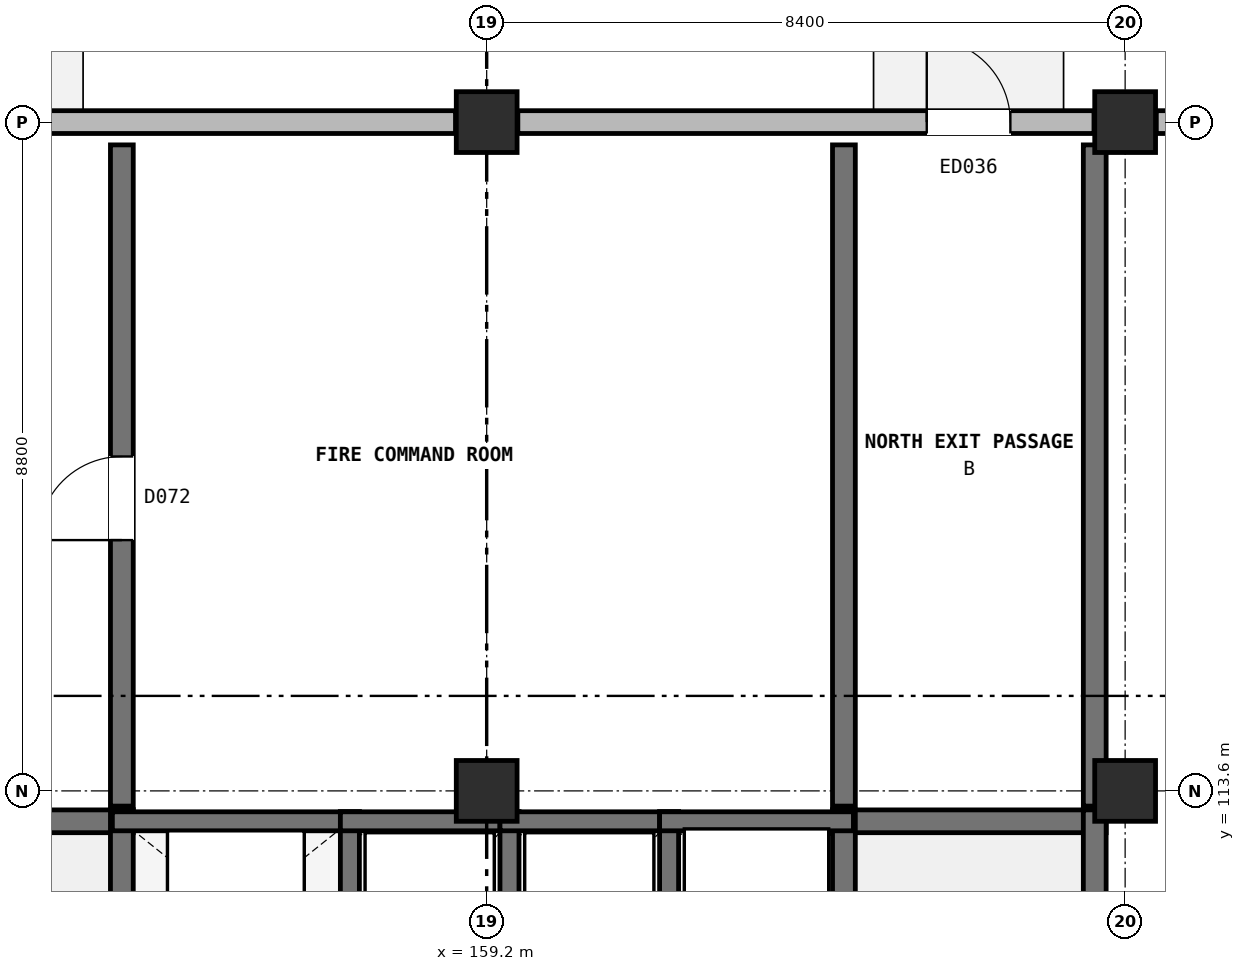
"""IFC4 building model, lengths in metres.
Left out: names, types, materials, properties, quantities, classifications, styles, units other than length and angle.
Written with IfcOpenShell. Run it as: python <this file> out.ifc"""

import sys

from ifc_helpers import new_model, si_unit, direction, frame, frame_2d, origin, origin_2d, place, context, subcontext, project, spatial, rectangle, extrude, element, fill, save


model = new_model("IFC4")
c1 = context("Model", 3, precision=1e-05, world=origin(), true_north=direction((0.0, 1.0)))
c2 = subcontext(c1, "Body", "Model", "MODEL_VIEW")
j1 = project(units=[si_unit("LENGTHUNIT", "METRE"), si_unit("PLANEANGLEUNIT", "RADIAN")], contexts=[c1])
p1 = place(None, origin())
s1 = spatial("IfcSite", under=j1, at=p1, CompositionType="ELEMENT")
p2 = place(p1, origin())
s2 = spatial("IfcBuilding", under=s1, at=p2, CompositionType="ELEMENT")
p3 = place(p2, origin())
s3 = spatial("IfcBuildingStorey", under=s2, at=p3, CompositionType="ELEMENT", Elevation=0.0)
for number, where, z_axis, x_axis in (
    (1, (159.2, 113.6, 0.0), (0.0, 0.0, 1.0), (1.0, 0.0, 0.0)),
    (2, (159.2, 122.4, 0.0), (0.0, 0.0, 1.0), (1.0, 0.0, 0.0)),
    (3, (167.6, 113.6, 0.0), (0.0, 0.0, 1.0), (1.0, 0.0, 0.0)),
    (4, (167.6, 122.4, 0.0), (0.0, 0.0, 1.0), (1.0, 0.0, 0.0)),
):
    element("IfcColumn", number, at=place(p3, frame(where, z_axis=z_axis, x_axis=x_axis)), inside=s3, PredefinedType="COLUMN", context=c2, shape_type="SweptSolid", body=[
        extrude(rectangle(XDim=0.8, YDim=0.8, at=origin_2d()), origin(), (0.0, 0.0, 1.0), 4.8),
    ])
p4 = place(p3, frame((175.59, 122.4, 0.0), z_axis=(0.0, 0.0, 1.0), x_axis=(-1.0, 0.0, 0.0)))
e5 = element("IfcWall", 5, at=p4, inside=s3, PredefinedType="SOLIDWALL", context=c2, shape_type="SweptSolid", body=[
    extrude(rectangle(XDim=7.58, YDim=0.3, at=frame_2d((3.79, 0.0))), origin(), (0.0, 0.0, 1.0), 4.05),
])
p5 = place(p4, frame((1.245, 0.0, 0.9)))
e6 = element("IfcOpeningElement", 6, at=p5, cuts=e5, PredefinedType="OPENING", context=c2, shape_type="SweptSolid", body=[
    extrude(rectangle(XDim=1.5, YDim=1.8, at=frame_2d((0.75, 0.9))), frame((0.0, 0.16, 0.0), z_axis=(0.0, -1.0, 0.0), x_axis=(1.0, 0.0, 0.0)), (0.0, 0.0, 1.0), 0.32),
])
p6 = place(p3, frame((167.19, 122.4, 0.0), z_axis=(0.0, 0.0, 1.0), x_axis=(-1.0, 0.0, 0.0)))
e7 = element("IfcWall", 7, at=p6, inside=s3, PredefinedType="SOLIDWALL", context=c2, shape_type="SweptSolid", body=[
    extrude(rectangle(XDim=7.58, YDim=0.3, at=frame_2d((3.79, 0.0))), origin(), (0.0, 0.0, 1.0), 4.05),
])
p7 = place(p6, frame((1.1, 0.0, 0.0)))
e8 = element("IfcOpeningElement", 8, at=p7, cuts=e7, PredefinedType="OPENING", context=c2, shape_type="SweptSolid", body=[
    extrude(rectangle(XDim=1.1, YDim=2.2, at=frame_2d((0.55, 1.1))), frame((0.0, 0.16, 0.0), z_axis=(0.0, -1.0, 0.0), x_axis=(1.0, 0.0, 0.0)), (0.0, 0.0, 1.0), 0.32),
])
p8 = place(p3, frame((158.79, 122.4, 0.0), z_axis=(0.0, 0.0, 1.0), x_axis=(-1.0, 0.0, 0.0)))
e9 = element("IfcWall", 9, at=p8, inside=s3, PredefinedType="SOLIDWALL", context=c2, shape_type="SweptSolid", body=[
    extrude(rectangle(XDim=7.58, YDim=0.3, at=frame_2d((3.79, 0.0))), origin(), (0.0, 0.0, 1.0), 4.05),
])
p9 = place(p8, frame((5.6, 0.0, 0.0)))
e10 = element("IfcOpeningElement", 10, at=p9, cuts=e9, PredefinedType="OPENING", context=c2, shape_type="SweptSolid", body=[
    extrude(rectangle(XDim=1.1, YDim=2.2, at=frame_2d((0.55, 1.1))), frame((0.0, 0.16, 0.0), z_axis=(0.0, -1.0, 0.0), x_axis=(1.0, 0.0, 0.0)), (0.0, 0.0, 1.0), 0.32),
])
p10 = place(p3, frame((150.95, 113.2, 0.0), z_axis=(0.0, 0.0, 1.0), x_axis=(1.0, 0.0, 0.0)))
e11 = element("IfcWall", 11, at=p10, inside=s3, PredefinedType="SHEAR", context=c2, shape_type="SweptSolid", body=[
    extrude(rectangle(XDim=3.6, YDim=0.3, at=frame_2d((1.8, 0.0))), origin(), (0.0, 0.0, 1.0), 4.8),
])
p11 = place(p3, frame((154.4, 105.05, 0.0), z_axis=(0.0, 0.0, 1.0), x_axis=(0.0, 1.0, 0.0)))
e12 = element("IfcWall", 12, at=p11, inside=s3, PredefinedType="SHEAR", context=c2, shape_type="SweptSolid", body=[
    extrude(rectangle(XDim=8.3, YDim=0.3, at=frame_2d((4.15, 0.0))), origin(), (0.0, 0.0, 1.0), 4.8),
])
p12 = place(p11, frame((0.45, 0.0, 0.0)))
e13 = element("IfcOpeningElement", 13, at=p12, cuts=e12, PredefinedType="OPENING", context=c2, shape_type="SweptSolid", body=[
    extrude(rectangle(XDim=1.1, YDim=2.2, at=frame_2d((0.55, 1.1))), frame((0.0, 0.16, 0.0), z_axis=(0.0, -1.0, 0.0), x_axis=(1.0, 0.0, 0.0)), (0.0, 0.0, 1.0), 0.32),
])
p13 = place(p3, frame((163.75, 113.2, 0.0), z_axis=(0.0, 0.0, 1.0), x_axis=(1.0, 0.0, 0.0)))
e14 = element("IfcWall", 14, at=p13, inside=s3, PredefinedType="SHEAR", context=c2, shape_type="SweptSolid", body=[
    extrude(rectangle(XDim=3.6, YDim=0.3, at=frame_2d((1.8, 0.0))), origin(), (0.0, 0.0, 1.0), 4.8),
])
for number, where, z_axis, x_axis in (
    (15, (163.9, 105.05, 0.0), (0.0, 0.0, 1.0), (0.0, 1.0, 0.0)),
    (16, (167.2, 105.05, 0.0), (0.0, 0.0, 1.0), (0.0, 1.0, 0.0)),
):
    element("IfcWall", number, at=place(p3, frame(where, z_axis=z_axis, x_axis=x_axis)), inside=s3, PredefinedType="SHEAR", context=c2, shape_type="SweptSolid", body=[
        extrude(rectangle(XDim=8.3, YDim=0.3, at=frame_2d((4.15, 0.0))), origin(), (0.0, 0.0, 1.0), 4.8),
    ])
p14 = place(p3, frame((154.275, 113.2, 0.0), z_axis=(0.0, 0.0, 1.0), x_axis=(1.0, 0.0, 0.0)))
e17 = element("IfcWall", 17, at=p14, inside=s3, PredefinedType="SOLIDWALL", context=c2, shape_type="SweptSolid", body=[
    extrude(rectangle(XDim=3.25, YDim=0.25, at=frame_2d((1.625, 0.0))), origin(), (0.0, 0.0, 1.0), 4.48),
])
p15 = place(p3, frame((157.4, 110.675, 0.0), z_axis=(0.0, 0.0, 1.0), x_axis=(0.0, 1.0, 0.0)))
e18 = element("IfcWall", 18, at=p15, inside=s3, PredefinedType="SOLIDWALL", context=c2, shape_type="SweptSolid", body=[
    extrude(rectangle(XDim=2.65, YDim=0.25, at=frame_2d((1.325, 0.0))), origin(), (0.0, 0.0, 1.0), 4.48),
])
p16 = place(p3, frame((157.275, 113.2, 0.0), z_axis=(0.0, 0.0, 1.0), x_axis=(1.0, 0.0, 0.0)))
e19 = element("IfcWall", 19, at=p16, inside=s3, PredefinedType="SOLIDWALL", context=c2, shape_type="SweptSolid", body=[
    extrude(rectangle(XDim=2.35, YDim=0.25, at=frame_2d((1.175, 0.0))), origin(), (0.0, 0.0, 1.0), 4.48),
])
p17 = place(p3, frame((159.5, 110.675, 0.0), z_axis=(0.0, 0.0, 1.0), x_axis=(0.0, 1.0, 0.0)))
e20 = element("IfcWall", 20, at=p17, inside=s3, PredefinedType="SOLIDWALL", context=c2, shape_type="SweptSolid", body=[
    extrude(rectangle(XDim=2.65, YDim=0.25, at=frame_2d((1.325, 0.0))), origin(), (0.0, 0.0, 1.0), 4.48),
])
p18 = place(p3, frame((159.375, 113.2, 0.0), z_axis=(0.0, 0.0, 1.0), x_axis=(1.0, 0.0, 0.0)))
e21 = element("IfcWall", 21, at=p18, inside=s3, PredefinedType="SOLIDWALL", context=c2, shape_type="SweptSolid", body=[
    extrude(rectangle(XDim=2.35, YDim=0.25, at=frame_2d((1.175, 0.0))), origin(), (0.0, 0.0, 1.0), 4.48),
])
p19 = place(p3, frame((161.6, 110.675, 0.0), z_axis=(0.0, 0.0, 1.0), x_axis=(0.0, 1.0, 0.0)))
e22 = element("IfcWall", 22, at=p19, inside=s3, PredefinedType="SOLIDWALL", context=c2, shape_type="SweptSolid", body=[
    extrude(rectangle(XDim=2.65, YDim=0.25, at=frame_2d((1.325, 0.0))), origin(), (0.0, 0.0, 1.0), 4.48),
])
p20 = place(p3, frame((161.475, 113.2, 0.0), z_axis=(0.0, 0.0, 1.0), x_axis=(1.0, 0.0, 0.0)))
e23 = element("IfcWall", 23, at=p20, inside=s3, PredefinedType="SOLIDWALL", context=c2, shape_type="SweptSolid", body=[
    extrude(rectangle(XDim=2.55, YDim=0.25, at=frame_2d((1.275, 0.0))), origin(), (0.0, 0.0, 1.0), 4.48),
])
p21 = place(p3, frame((154.4, 113.4, 0.0), z_axis=(0.0, 0.0, 1.0), x_axis=(0.0, 1.0, 0.0)))
e24 = element("IfcWall", 24, at=p21, inside=s3, PredefinedType="SHEAR", context=c2, shape_type="SweptSolid", body=[
    extrude(rectangle(XDim=8.7, YDim=0.3, at=frame_2d((4.35, 0.0))), origin(), (0.0, 0.0, 1.0), 4.48),
])
p22 = place(p21, frame((3.5, 0.0, 0.0)))
e25 = element("IfcOpeningElement", 25, at=p22, cuts=e24, PredefinedType="OPENING", context=c2, shape_type="SweptSolid", body=[
    extrude(rectangle(XDim=1.1, YDim=2.2, at=frame_2d((0.55, 1.1))), frame((0.0, 0.16, 0.0), z_axis=(0.0, -1.0, 0.0), x_axis=(1.0, 0.0, 0.0)), (0.0, 0.0, 1.0), 0.32),
])
for number, where, z_axis, x_axis in (
    (26, (163.9, 113.4, 0.0), (0.0, 0.0, 1.0), (0.0, 1.0, 0.0)),
    (27, (167.2, 113.4, 0.0), (0.0, 0.0, 1.0), (0.0, 1.0, 0.0)),
):
    element("IfcWall", number, at=place(p3, frame(where, z_axis=z_axis, x_axis=x_axis)), inside=s3, PredefinedType="SHEAR", context=c2, shape_type="SweptSolid", body=[
        extrude(rectangle(XDim=8.7, YDim=0.3, at=frame_2d((4.35, 0.0))), origin(), (0.0, 0.0, 1.0), 4.48),
    ])
p23 = place(p7, frame((1.1, 0.0, 0.0), z_axis=(0.0, 0.0, 1.0), x_axis=(-1.0, 0.0, 0.0)))
e28 = element("IfcDoor", 28, at=p23, inside=s3, OperationType="SINGLE_SWING_RIGHT", PredefinedType="DOOR", context=c2, shape_type="SweptSolid", body=[
    extrude(rectangle(XDim=1.1, YDim=2.2, at=frame_2d((0.55, 1.1))), frame((0.0, 0.025, 0.0), z_axis=(0.0, -1.0, 0.0), x_axis=(1.0, 0.0, 0.0)), (0.0, 0.0, 1.0), 0.05),
])
fill(e8, e28)
p24 = place(p22, origin())
e29 = element("IfcDoor", 29, at=p24, inside=s3, OperationType="SINGLE_SWING_LEFT", PredefinedType="DOOR", context=c2, shape_type="SweptSolid", body=[
    extrude(rectangle(XDim=1.1, YDim=2.2, at=frame_2d((0.55, 1.1))), frame((0.0, 0.025, 0.0), z_axis=(0.0, -1.0, 0.0), x_axis=(1.0, 0.0, 0.0)), (0.0, 0.0, 1.0), 0.05),
])
fill(e25, e29)
save(model, sys.argv[1])
